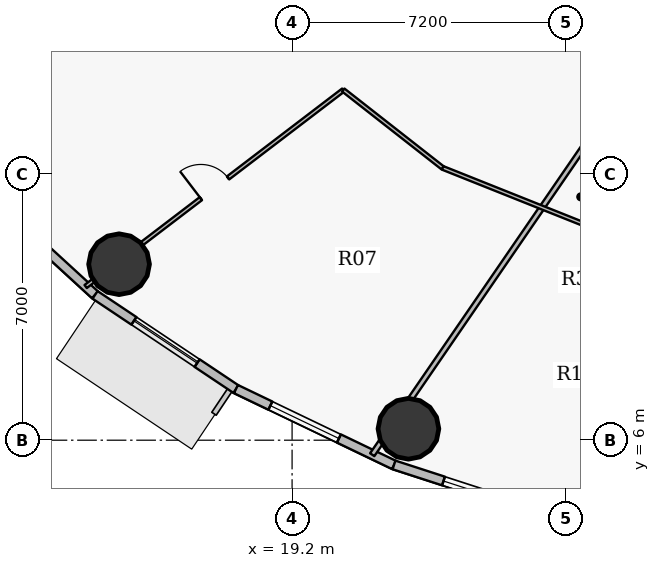
"""IFC4 building model, lengths in metres.
Left out: names, types, materials, properties, quantities, classifications, styles, units other than length and angle.
Written with IfcOpenShell. Run it as: python <this file> out.ifc"""

import sys

from ifc_helpers import new_model, si_unit, direction, frame, frame_2d, origin, origin_2d, place, context, subcontext, project, spatial, rectangle, hollow_circle, extrude, source, transform, mapped, element, fill, save


model = new_model("IFC4")
c1 = context("Model", 3, precision=1e-05, world=origin(), true_north=direction((0.0, 1.0)))
c2 = subcontext(c1, "Body", "Model", "MODEL_VIEW")
j1 = project(units=[si_unit("LENGTHUNIT", "METRE"), si_unit("PLANEANGLEUNIT", "RADIAN")], contexts=[c1])
p1 = place(None, origin())
s1 = spatial("IfcSite", under=j1, at=p1, CompositionType="ELEMENT")
p2 = place(p1, origin())
s2 = spatial("IfcBuilding", under=s1, at=p2, CompositionType="ELEMENT")
p3 = place(p2, frame((0.0, 0.0, 78.6)))
s3 = spatial("IfcBuildingStorey", under=s2, at=p3, CompositionType="ELEMENT", Elevation=78.6)
for number, where, z_axis, x_axis in (
    (1, (14.647, 10.631, 0.0), (0.0, 0.0, 1.0), (1.0, 0.0, 0.0)),
    (2, (22.262, 6.301, 0.0), (0.0, 0.0, 1.0), (1.0, 0.0, 0.0)),
):
    element("IfcColumn", number, at=place(p3, frame(where, z_axis=z_axis, x_axis=x_axis)), inside=s3, PredefinedType="COLUMN", context=c2, shape_type="SweptSolid", body=[
        extrude(hollow_circle(Radius=0.8, WallThickness=0.045, at=origin_2d()), origin(), (0.0, 0.0, 1.0), 4.2),
    ])
p4 = place(p3, frame((14.015, 9.824, 0.0), z_axis=(0.0, 0.0, 1.0), x_axis=(-0.737116376281, 0.67576582321, 0.0)))
e3 = element("IfcWall", 3, at=p4, inside=s3, PredefinedType="SOLIDWALL", context=c2, shape_type="SweptSolid", body=[
    extrude(rectangle(XDim=4.294, YDim=0.24, at=frame_2d((2.147, 0.0))), origin(), (0.0, 0.0, 1.0), 3.95),
])
p5 = place(p4, frame((2.3, 0.0, 0.9)))
e4 = element("IfcOpeningElement", 4, at=p5, cuts=e3, PredefinedType="OPENING", context=c2, shape_type="SweptSolid", body=[
    extrude(rectangle(XDim=1.25, YDim=1.65, at=origin_2d()), frame((0.625, 0.13, 0.825), z_axis=(0.0, -1.0, 0.0), x_axis=(1.0, 0.0, 0.0)), (0.0, 0.0, 1.0), 0.26),
])
p6 = place(p3, frame((17.723, 7.344, 0.0), z_axis=(0.0, 0.0, 1.0), x_axis=(-0.831240982525, 0.555912249343, 0.0)))
e5 = element("IfcWall", 5, at=p6, inside=s3, PredefinedType="SOLIDWALL", context=c2, shape_type="SweptSolid", body=[
    extrude(rectangle(XDim=4.46, YDim=0.24, at=frame_2d((2.23, 0.0))), origin(), (0.0, 0.0, 1.0), 3.95),
])
p7 = place(p6, frame((1.23, 0.0, 0.9)))
e6 = element("IfcOpeningElement", 6, at=p7, cuts=e5, PredefinedType="OPENING", context=c2, shape_type="SweptSolid", body=[
    extrude(rectangle(XDim=2.0, YDim=1.75, at=origin_2d()), frame((1.0, 0.13, 0.875), z_axis=(0.0, -1.0, 0.0), x_axis=(1.0, 0.0, 0.0)), (0.0, 0.0, 1.0), 0.26),
])
p8 = place(p3, frame((21.882, 5.349, 0.0), z_axis=(0.0, 0.0, 1.0), x_axis=(-0.901601503137, 0.432567601123, 0.0)))
e7 = element("IfcWall", 7, at=p8, inside=s3, PredefinedType="SOLIDWALL", context=c2, shape_type="SweptSolid", body=[
    extrude(rectangle(XDim=4.613, YDim=0.24, at=frame_2d((2.306, 0.0))), origin(), (0.0, 0.0, 1.0), 3.95),
])
p9 = place(p8, frame((1.609, 0.0, 0.9)))
e8 = element("IfcOpeningElement", 8, at=p9, cuts=e7, PredefinedType="OPENING", context=c2, shape_type="SweptSolid", body=[
    extrude(rectangle(XDim=2.0, YDim=1.75, at=origin_2d()), frame((1.0, 0.13, 0.875), z_axis=(0.0, -1.0, 0.0), x_axis=(1.0, 0.0, 0.0)), (0.0, 0.0, 1.0), 0.26),
])
p10 = place(p3, frame((26.389, 3.887, 0.0), z_axis=(0.0, 0.0, 1.0), x_axis=(-0.951207699013, 0.308551313946, 0.0)))
e9 = element("IfcWall", 9, at=p10, inside=s3, PredefinedType="SOLIDWALL", context=c2, shape_type="SweptSolid", body=[
    extrude(rectangle(XDim=4.739, YDim=0.24, at=frame_2d((2.369, 0.0))), origin(), (0.0, 0.0, 1.0), 3.95),
])
p11 = place(p10, frame((1.369, 0.0, 0.9)))
e10 = element("IfcOpeningElement", 10, at=p11, cuts=e9, PredefinedType="OPENING", context=c2, shape_type="SweptSolid", body=[
    extrude(rectangle(XDim=2.0, YDim=1.75, at=origin_2d()), frame((1.0, 0.13, 0.875), z_axis=(0.0, -1.0, 0.0), x_axis=(1.0, 0.0, 0.0)), (0.0, 0.0, 1.0), 0.26),
])
p12 = place(p3, frame((13.768, 10.043, 0.0), z_axis=(0.0, 0.0, 1.0), x_axis=(0.795121316636, 0.606450403439, 0.0)))
e11 = element("IfcWall", 11, at=p12, inside=s3, PredefinedType="PARTITIONING", context=c2, shape_type="SweptSolid", body=[
    extrude(rectangle(XDim=8.525, YDim=0.1, at=frame_2d((4.262, 0.0))), origin(), (0.0, 0.0, 1.0), 3.285),
])
p13 = place(p12, frame((3.812, 0.0, 0.0)))
e12 = element("IfcOpeningElement", 12, at=p13, cuts=e11, PredefinedType="OPENING", context=c2, shape_type="SweptSolid", body=[
    extrude(rectangle(XDim=0.9, YDim=2.1, at=origin_2d()), frame((0.45, 0.06, 1.05), z_axis=(0.0, -1.0, 0.0), x_axis=(1.0, 0.0, 0.0)), (0.0, 0.0, 1.0), 0.12),
])
p14 = place(p3, frame((20.547, 15.213, 0.0), z_axis=(0.0, 0.0, 1.0), x_axis=(0.78737784261, -0.616470707307, 0.0)))
e13 = element("IfcWall", 13, at=p14, inside=s3, PredefinedType="PARTITIONING", context=c2, shape_type="SweptSolid", body=[
    extrude(rectangle(XDim=3.323, YDim=0.1, at=frame_2d((1.661, 0.0))), origin(), (0.0, 0.0, 1.0), 3.285),
])
p15 = place(p3, frame((21.309, 5.618, 0.0), z_axis=(0.0, 0.0, 1.0), x_axis=(0.566302415372, 0.82419753357, 0.0)))
e14 = element("IfcWall", 14, at=p15, inside=s3, PredefinedType="PARTITIONING", context=c2, shape_type="SweptSolid", body=[
    extrude(rectangle(XDim=14.234, YDim=0.135, at=frame_2d((7.117, 0.0))), origin(), (0.0, 0.0, 1.0), 3.285),
])
p16 = place(p3, frame((23.163, 13.165, 0.0), z_axis=(0.0, 0.0, 1.0), x_axis=(0.928799979038, -0.370581433613, 0.0)))
e15 = element("IfcWall", 15, at=p16, inside=s3, PredefinedType="PARTITIONING", context=c2, shape_type="SweptSolid", body=[
    extrude(rectangle(XDim=6.555, YDim=0.1, at=frame_2d((3.278, 0.0))), origin(), (0.0, 0.0, 1.0), 3.285),
])
m1 = source(origin(), c2, "Body", "SweptSolid", [
    extrude(rectangle(XDim=2.0, YDim=1.75, at=origin_2d()), frame((1.0, 0.03, 0.875), z_axis=(0.0, -1.0, 0.0), x_axis=(1.0, 0.0, 0.0)), (0.0, 0.0, 1.0), 0.06),
])
p17 = place(p7, origin())
e16 = element("IfcWindow", 16, at=p17, inside=s3, PartitioningType="DOUBLE_PANEL_VERTICAL", PredefinedType="WINDOW", context=c2, shape_type="MappedRepresentation", body=[
    mapped(m1, transform((0.0, 0.0, 0.0), x_axis=(1.0, 0.0, 0.0), y_axis=(0.0, 1.0, 0.0), z_axis=(0.0, 0.0, 1.0), scale=1.0)),
])
fill(e6, e16)
p18 = place(p9, origin())
e17 = element("IfcWindow", 17, at=p18, inside=s3, PartitioningType="DOUBLE_PANEL_VERTICAL", PredefinedType="WINDOW", context=c2, shape_type="MappedRepresentation", body=[
    mapped(m1, transform((0.0, 0.0, 0.0), x_axis=(1.0, 0.0, 0.0), y_axis=(0.0, 1.0, 0.0), z_axis=(0.0, 0.0, 1.0), scale=1.0)),
])
fill(e8, e17)
p19 = place(p11, origin())
e18 = element("IfcWindow", 18, at=p19, inside=s3, PartitioningType="DOUBLE_PANEL_VERTICAL", PredefinedType="WINDOW", context=c2, shape_type="MappedRepresentation", body=[
    mapped(m1, transform((0.0, 0.0, 0.0), x_axis=(1.0, 0.0, 0.0), y_axis=(0.0, 1.0, 0.0), z_axis=(0.0, 0.0, 1.0), scale=1.0)),
])
fill(e10, e18)
m2 = source(origin(), c2, "Body", "SweptSolid", [
    extrude(rectangle(XDim=0.9, YDim=2.1, at=origin_2d()), frame((0.45, 0.025, 1.05), z_axis=(0.0, -1.0, 0.0), x_axis=(1.0, 0.0, 0.0)), (0.0, 0.0, 1.0), 0.05),
])
p20 = place(p13, origin())
e19 = element("IfcDoor", 19, at=p20, inside=s3, OperationType="SINGLE_SWING_LEFT", PredefinedType="DOOR", context=c2, shape_type="MappedRepresentation", body=[
    mapped(m2, transform((0.0, 0.0, 0.0), x_axis=(1.0, 0.0, 0.0), y_axis=(0.0, 1.0, 0.0), z_axis=(0.0, 0.0, 1.0), scale=1.0)),
])
fill(e12, e19)
save(model, sys.argv[1])
